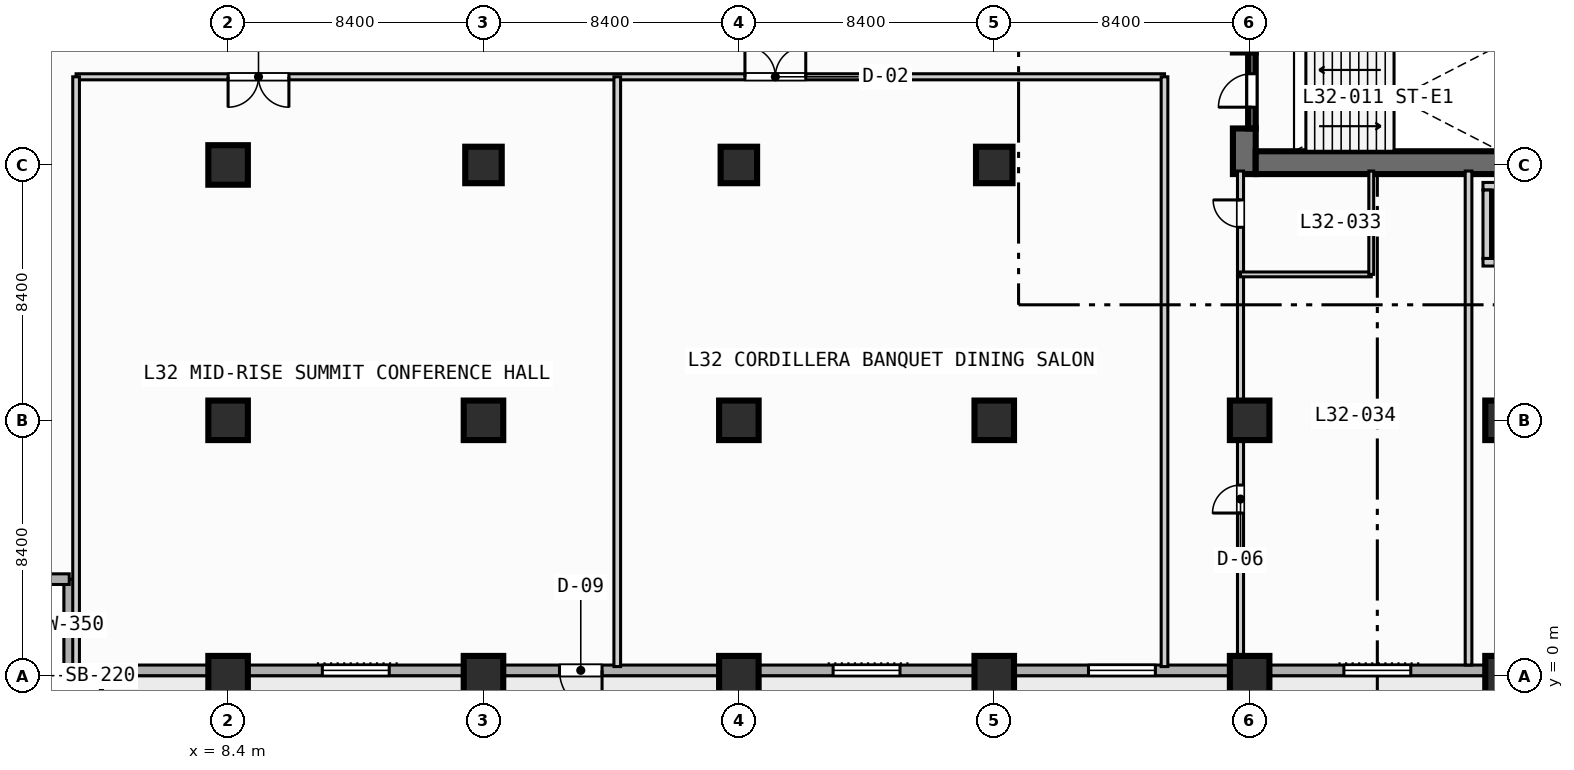
"""IFC4 building model, lengths in metres.
Left out: names, types, materials, properties, quantities, classifications, styles, units other than length and angle.
Written with IfcOpenShell. Run it as: python <this file> out.ifc"""

import sys

from ifc_helpers import new_model, si_unit, direction, frame, frame_2d, origin, origin_2d, place, context, subcontext, project, spatial, rectangle, extrude, element, fill, save


model = new_model("IFC4")
c1 = context("Model", 3, precision=1e-05, world=origin(), true_north=direction((0.0, 1.0)))
c2 = subcontext(c1, "Body", "Model", "MODEL_VIEW")
j1 = project(units=[si_unit("LENGTHUNIT", "METRE"), si_unit("PLANEANGLEUNIT", "RADIAN")], contexts=[c1])
p1 = place(None, origin())
s1 = spatial("IfcSite", under=j1, at=p1, CompositionType="ELEMENT")
p2 = place(p1, origin())
s2 = spatial("IfcBuilding", under=s1, at=p2, CompositionType="ELEMENT")
p3 = place(p2, frame((0.0, 0.0, 134.2)))
s3 = spatial("IfcBuildingStorey", under=s2, at=p3, CompositionType="ELEMENT", Elevation=134.2)
p4 = place(p3, frame((41.825, 16.5, 0.0), z_axis=(0.0, 0.0, 1.0), x_axis=(0.0, 1.0, 0.0)))
e1 = element("IfcWall", 1, at=p4, inside=s3, PredefinedType="SHEAR", context=c2, shape_type="SweptSolid", body=[
    extrude(rectangle(XDim=1.5, YDim=0.75, at=frame_2d((0.75, 0.0))), origin(), (0.0, 0.0, 1.0), 3.55),
])
p5 = place(p3, frame((42.2, 16.875, 0.0), z_axis=(0.0, 0.0, 1.0), x_axis=(1.0, 0.0, 0.0)))
e2 = element("IfcWall", 2, at=p5, inside=s3, PredefinedType="SHEAR", context=c2, shape_type="SweptSolid", body=[
    extrude(rectangle(XDim=16.35, YDim=0.75, at=frame_2d((8.175, 0.0))), origin(), (0.0, 0.0, 1.0), 3.55),
])
for number, where, z_axis, x_axis in (
    (3, (8.4, 0.0, 0.0), (0.0, 0.0, 1.0), (1.0, 0.0, 0.0)),
    (4, (8.4, 8.4, 0.0), (0.0, 0.0, 1.0), (1.0, 0.0, 0.0)),
    (5, (8.4, 16.8, 0.0), (0.0, 0.0, 1.0), (1.0, 0.0, 0.0)),
    (6, (16.8, 0.0, 0.0), (0.0, 0.0, 1.0), (1.0, 0.0, 0.0)),
    (7, (16.8, 8.4, 0.0), (0.0, 0.0, 1.0), (1.0, 0.0, 0.0)),
):
    element("IfcColumn", number, at=place(p3, frame(where, z_axis=z_axis, x_axis=x_axis)), inside=s3, PredefinedType="COLUMN", context=c2, shape_type="SweptSolid", body=[
        extrude(rectangle(XDim=1.3, YDim=1.3, at=origin_2d()), origin(), (0.0, 0.0, 1.0), 3.8),
    ])
p6 = place(p3, frame((16.8, 16.8, 0.0), z_axis=(0.0, 0.0, 1.0), x_axis=(1.0, 0.0, 0.0)))
e8 = element("IfcColumn", 8, at=p6, inside=s3, PredefinedType="COLUMN", context=c2, shape_type="SweptSolid", body=[
    extrude(rectangle(XDim=1.2, YDim=1.2, at=origin_2d()), origin(), (0.0, 0.0, 1.0), 3.8),
])
for number, where, z_axis, x_axis in (
    (9, (25.2, 0.0, 0.0), (0.0, 0.0, 1.0), (1.0, 0.0, 0.0)),
    (10, (25.2, 8.4, 0.0), (0.0, 0.0, 1.0), (1.0, 0.0, 0.0)),
):
    element("IfcColumn", number, at=place(p3, frame(where, z_axis=z_axis, x_axis=x_axis)), inside=s3, PredefinedType="COLUMN", context=c2, shape_type="SweptSolid", body=[
        extrude(rectangle(XDim=1.3, YDim=1.3, at=origin_2d()), origin(), (0.0, 0.0, 1.0), 3.8),
    ])
p7 = place(p3, frame((25.2, 16.8, 0.0), z_axis=(0.0, 0.0, 1.0), x_axis=(1.0, 0.0, 0.0)))
e11 = element("IfcColumn", 11, at=p7, inside=s3, PredefinedType="COLUMN", context=c2, shape_type="SweptSolid", body=[
    extrude(rectangle(XDim=1.2, YDim=1.2, at=origin_2d()), origin(), (0.0, 0.0, 1.0), 3.8),
])
for number, where, z_axis, x_axis in (
    (12, (33.6, 0.0, 0.0), (0.0, 0.0, 1.0), (1.0, 0.0, 0.0)),
    (13, (33.6, 8.4, 0.0), (0.0, 0.0, 1.0), (1.0, 0.0, 0.0)),
):
    element("IfcColumn", number, at=place(p3, frame(where, z_axis=z_axis, x_axis=x_axis)), inside=s3, PredefinedType="COLUMN", context=c2, shape_type="SweptSolid", body=[
        extrude(rectangle(XDim=1.3, YDim=1.3, at=origin_2d()), origin(), (0.0, 0.0, 1.0), 3.8),
    ])
p8 = place(p3, frame((33.6, 16.8, 0.0), z_axis=(0.0, 0.0, 1.0), x_axis=(1.0, 0.0, 0.0)))
e14 = element("IfcColumn", 14, at=p8, inside=s3, PredefinedType="COLUMN", context=c2, shape_type="SweptSolid", body=[
    extrude(rectangle(XDim=1.2, YDim=1.2, at=origin_2d()), origin(), (0.0, 0.0, 1.0), 3.8),
])
for number, where, z_axis, x_axis in (
    (15, (42.0, 0.0, 0.0), (0.0, 0.0, 1.0), (1.0, 0.0, 0.0)),
    (16, (42.0, 8.4, 0.0), (0.0, 0.0, 1.0), (1.0, 0.0, 0.0)),
    (17, (50.4, 0.0, 0.0), (0.0, 0.0, 1.0), (1.0, 0.0, 0.0)),
    (18, (50.4, 8.4, 0.0), (0.0, 0.0, 1.0), (1.0, 0.0, 0.0)),
):
    element("IfcColumn", number, at=place(p3, frame(where, z_axis=z_axis, x_axis=x_axis)), inside=s3, PredefinedType="COLUMN", context=c2, shape_type="SweptSolid", body=[
        extrude(rectangle(XDim=1.3, YDim=1.3, at=origin_2d()), origin(), (0.0, 0.0, 1.0), 3.8),
    ])
for number, where, z_axis, x_axis in (
    (19, (3.175, 0.175, 0.0), (0.0, 0.0, 1.0), (0.0, 1.0, 0.0)),
    (20, (3.175, 3.175, 0.0), (0.0, 0.0, 1.0), (-1.0, 0.0, 0.0)),
):
    element("IfcWall", number, at=place(p3, frame(where, z_axis=z_axis, x_axis=x_axis)), inside=s3, PredefinedType="STANDARD", context=c2, shape_type="SweptSolid", body=[
        extrude(rectangle(XDim=3.0, YDim=0.35, at=frame_2d((1.5, 0.0))), origin(), (0.0, 0.0, 1.0), 3.55),
    ])
p9 = place(p3, frame((72.425, 0.175, 0.0), z_axis=(0.0, 0.0, 1.0), x_axis=(-1.0, 0.0, 0.0)))
e21 = element("IfcWall", 21, at=p9, inside=s3, PredefinedType="STANDARD", context=c2, shape_type="SweptSolid", body=[
    extrude(rectangle(XDim=69.25, YDim=0.35, at=frame_2d((34.625, 0.0))), origin(), (0.0, 0.0, 1.0), 3.55),
])
p10 = place(p9, frame((51.725, 0.0, 0.0)))
e22 = element("IfcOpeningElement", 22, at=p10, cuts=e21, PredefinedType="OPENING", context=c2, shape_type="SweptSolid", body=[
    extrude(rectangle(XDim=1.4, YDim=2.2, at=frame_2d((0.7, 1.1))), frame((0.0, 0.185, 0.0), z_axis=(0.0, -1.0, 0.0), x_axis=(1.0, 0.0, 0.0)), (0.0, 0.0, 1.0), 0.37),
])
p11 = place(p9, frame((58.725, 0.0, 0.85)))
e23 = element("IfcOpeningElement", 23, at=p11, cuts=e21, PredefinedType="OPENING", context=c2, shape_type="SweptSolid", body=[
    extrude(rectangle(XDim=2.2, YDim=1.8, at=frame_2d((1.1, 0.9))), frame((0.0, 0.185, 0.0), z_axis=(0.0, -1.0, 0.0), x_axis=(1.0, 0.0, 0.0)), (0.0, 0.0, 1.0), 0.37),
])
p12 = place(p9, frame((41.925, 0.0, 0.85)))
e24 = element("IfcOpeningElement", 24, at=p12, cuts=e21, PredefinedType="OPENING", context=c2, shape_type="SweptSolid", body=[
    extrude(rectangle(XDim=2.2, YDim=1.8, at=frame_2d((1.1, 0.9))), frame((0.0, 0.185, 0.0), z_axis=(0.0, -1.0, 0.0), x_axis=(1.0, 0.0, 0.0)), (0.0, 0.0, 1.0), 0.37),
])
p13 = place(p9, frame((33.525, 0.0, 0.85)))
e25 = element("IfcOpeningElement", 25, at=p13, cuts=e21, PredefinedType="OPENING", context=c2, shape_type="SweptSolid", body=[
    extrude(rectangle(XDim=2.2, YDim=1.8, at=frame_2d((1.1, 0.9))), frame((0.0, 0.185, 0.0), z_axis=(0.0, -1.0, 0.0), x_axis=(1.0, 0.0, 0.0)), (0.0, 0.0, 1.0), 0.37),
])
p14 = place(p9, frame((25.125, 0.0, 0.85)))
e26 = element("IfcOpeningElement", 26, at=p14, cuts=e21, PredefinedType="OPENING", context=c2, shape_type="SweptSolid", body=[
    extrude(rectangle(XDim=2.2, YDim=1.8, at=frame_2d((1.1, 0.9))), frame((0.0, 0.185, 0.0), z_axis=(0.0, -1.0, 0.0), x_axis=(1.0, 0.0, 0.0)), (0.0, 0.0, 1.0), 0.37),
])
p15 = place(p3, frame((42.075, 18.0, 0.0), z_axis=(0.0, 0.0, 1.0), x_axis=(0.0, 1.0, 0.0)))
e27 = element("IfcWall", 27, at=p15, inside=s3, PredefinedType="SOLIDWALL", context=c2, shape_type="SweptSolid", body=[
    extrude(rectangle(XDim=2.5, YDim=0.25, at=frame_2d((1.25, 0.0))), origin(), (0.0, 0.0, 1.0), 3.55),
])
p16 = place(p15, frame((0.7, 0.0, 0.0)))
e28 = element("IfcOpeningElement", 28, at=p16, cuts=e27, PredefinedType="OPENING", context=c2, shape_type="SweptSolid", body=[
    extrude(rectangle(XDim=1.1, YDim=2.15, at=frame_2d((0.55, 1.075))), frame((0.0, 0.135, 0.0), z_axis=(0.0, -1.0, 0.0), x_axis=(1.0, 0.0, 0.0)), (0.0, 0.0, 1.0), 0.27),
])
p17 = place(p3, frame((49.675, 13.6, 0.0), z_axis=(0.0, 0.0, 1.0), x_axis=(1.0, 0.0, 0.0)))
e29 = element("IfcWall", 29, at=p17, inside=s3, PredefinedType="SOLIDWALL", context=c2, shape_type="SweptSolid", body=[
    extrude(rectangle(XDim=2.25, YDim=0.25, at=frame_2d((1.125, 0.0))), origin(), (0.0, 0.0, 1.0), 3.55),
])
p18 = place(p17, frame((0.4, 0.0, 0.0)))
e30 = element("IfcOpeningElement", 30, at=p18, cuts=e29, PredefinedType="OPENING", context=c2, shape_type="SweptSolid", body=[
    extrude(rectangle(XDim=1.1, YDim=2.15, at=frame_2d((0.55, 1.075))), frame((0.0, 0.135, 0.0), z_axis=(0.0, -1.0, 0.0), x_axis=(1.0, 0.0, 0.0)), (0.0, 0.0, 1.0), 0.27),
])
for number, where, z_axis, x_axis in (
    (31, (49.675, 16.1, 0.0), (0.0, 0.0, 1.0), (1.0, 0.0, 0.0)),
    (32, (49.8, 13.725, 0.0), (0.0, 0.0, 1.0), (0.0, 1.0, 0.0)),
):
    element("IfcWall", number, at=place(p3, frame(where, z_axis=z_axis, x_axis=x_axis)), inside=s3, PredefinedType="SOLIDWALL", context=c2, shape_type="SweptSolid", body=[
        extrude(rectangle(XDim=2.25, YDim=0.25, at=frame_2d((1.125, 0.0))), origin(), (0.0, 0.0, 1.0), 3.55),
    ])
p19 = place(p3, frame((41.7, 0.35, 0.0), z_axis=(0.0, 0.0, 1.0), x_axis=(0.0, 1.0, 0.0)))
e33 = element("IfcWall", 33, at=p19, inside=s3, PredefinedType="PARTITIONING", context=c2, shape_type="SweptSolid", body=[
    extrude(rectangle(XDim=16.25, YDim=0.2, at=frame_2d((8.125, 0.0))), origin(), (0.0, 0.0, 1.0), 2.8),
])
p20 = place(p19, frame((5.0, 0.0, 0.0)))
e34 = element("IfcOpeningElement", 34, at=p20, cuts=e33, PredefinedType="OPENING", context=c2, shape_type="SweptSolid", body=[
    extrude(rectangle(XDim=0.92, YDim=2.1, at=frame_2d((0.46, 1.05))), frame((0.0, 0.11, 0.0), z_axis=(0.0, -1.0, 0.0), x_axis=(1.0, 0.0, 0.0)), (0.0, 0.0, 1.0), 0.22),
])
p21 = place(p19, frame((14.4, 0.0, 0.0)))
e35 = element("IfcOpeningElement", 35, at=p21, cuts=e33, PredefinedType="OPENING", context=c2, shape_type="SweptSolid", body=[
    extrude(rectangle(XDim=0.9, YDim=2.1, at=frame_2d((0.45, 1.05))), frame((0.0, 0.11, 0.0), z_axis=(0.0, -1.0, 0.0), x_axis=(1.0, 0.0, 0.0)), (0.0, 0.0, 1.0), 0.22),
])
p22 = place(p3, frame((49.2, 0.35, 0.0), z_axis=(0.0, 0.0, 1.0), x_axis=(0.0, 1.0, 0.0)))
e36 = element("IfcWall", 36, at=p22, inside=s3, PredefinedType="PARTITIONING", context=c2, shape_type="SweptSolid", body=[
    extrude(rectangle(XDim=16.25, YDim=0.22, at=frame_2d((8.125, 0.0))), origin(), (0.0, 0.0, 1.0), 3.55),
])
p23 = place(p3, frame((41.7, 13.2, 0.0), z_axis=(0.0, 0.0, 1.0), x_axis=(1.0, 0.0, 0.0)))
e37 = element("IfcWall", 37, at=p23, inside=s3, PredefinedType="PARTITIONING", context=c2, shape_type="SweptSolid", body=[
    extrude(rectangle(XDim=4.3, YDim=0.16, at=frame_2d((2.15, 0.0))), origin(), (0.0, 0.0, 1.0), 3.55),
])
p24 = place(p3, frame((46.0, 13.2, 0.0), z_axis=(0.0, 0.0, 1.0), x_axis=(0.0, 1.0, 0.0)))
e38 = element("IfcWall", 38, at=p24, inside=s3, PredefinedType="PARTITIONING", context=c2, shape_type="SweptSolid", body=[
    extrude(rectangle(XDim=3.4, YDim=0.16, at=frame_2d((1.7, 0.0))), origin(), (0.0, 0.0, 1.0), 3.55),
])
p25 = place(p3, frame((3.4, 19.7, 0.0), z_axis=(0.0, 0.0, 1.0), x_axis=(1.0, 0.0, 0.0)))
e39 = element("IfcWall", 39, at=p25, inside=s3, PredefinedType="PARTITIONING", context=c2, shape_type="SweptSolid", body=[
    extrude(rectangle(XDim=35.8, YDim=0.2, at=frame_2d((17.9, 0.0))), origin(), (0.0, 0.0, 1.0), 3.55),
])
p26 = place(p25, frame((5.0, 0.0, 0.0)))
e40 = element("IfcOpeningElement", 40, at=p26, cuts=e39, PredefinedType="OPENING", context=c2, shape_type="SweptSolid", body=[
    extrude(rectangle(XDim=2.0, YDim=2.15, at=frame_2d((1.0, 1.075))), frame((0.0, 0.11, 0.0), z_axis=(0.0, -1.0, 0.0), x_axis=(1.0, 0.0, 0.0)), (0.0, 0.0, 1.0), 0.22),
])
p27 = place(p25, frame((22.0, 0.0, 0.0)))
e41 = element("IfcOpeningElement", 41, at=p27, cuts=e39, PredefinedType="OPENING", context=c2, shape_type="SweptSolid", body=[
    extrude(rectangle(XDim=2.0, YDim=2.15, at=frame_2d((1.0, 1.075))), frame((0.0, 0.11, 0.0), z_axis=(0.0, -1.0, 0.0), x_axis=(1.0, 0.0, 0.0)), (0.0, 0.0, 1.0), 0.22),
])
for number, where, z_axis, x_axis in (
    (42, (3.4, 0.3, 0.0), (0.0, 0.0, 1.0), (0.0, 1.0, 0.0)),
    (43, (21.2, 0.3, 0.0), (0.0, 0.0, 1.0), (0.0, 1.0, 0.0)),
    (44, (39.2, 0.3, 0.0), (0.0, 0.0, 1.0), (0.0, 1.0, 0.0)),
):
    element("IfcWall", number, at=place(p3, frame(where, z_axis=z_axis, x_axis=x_axis)), inside=s3, PredefinedType="PARTITIONING", context=c2, shape_type="SweptSolid", body=[
        extrude(rectangle(XDim=19.4, YDim=0.22, at=frame_2d((9.7, 0.0))), origin(), (0.0, 0.0, 1.0), 3.55),
    ])
p28 = place(p10, origin())
e45 = element("IfcDoor", 45, at=p28, inside=s3, OperationType="SINGLE_SWING_LEFT", PredefinedType="DOOR", context=c2, shape_type="SweptSolid", body=[
    extrude(rectangle(XDim=1.4, YDim=2.2, at=frame_2d((0.7, 1.1))), frame((0.0, 0.025, 0.0), z_axis=(0.0, -1.0, 0.0), x_axis=(1.0, 0.0, 0.0)), (0.0, 0.0, 1.0), 0.05),
])
fill(e22, e45)
p29 = place(p11, origin())
e46 = element("IfcWindow", 46, at=p29, inside=s3, PartitioningType="SINGLE_PANEL", PredefinedType="WINDOW", context=c2, shape_type="SweptSolid", body=[
    extrude(rectangle(XDim=2.2, YDim=1.8, at=frame_2d((1.1, 0.9))), frame((0.0, 0.03, 0.0), z_axis=(0.0, -1.0, 0.0), x_axis=(1.0, 0.0, 0.0)), (0.0, 0.0, 1.0), 0.06),
])
fill(e23, e46)
p30 = place(p12, origin())
e47 = element("IfcWindow", 47, at=p30, inside=s3, PartitioningType="SINGLE_PANEL", PredefinedType="WINDOW", context=c2, shape_type="SweptSolid", body=[
    extrude(rectangle(XDim=2.2, YDim=1.8, at=frame_2d((1.1, 0.9))), frame((0.0, 0.03, 0.0), z_axis=(0.0, -1.0, 0.0), x_axis=(1.0, 0.0, 0.0)), (0.0, 0.0, 1.0), 0.06),
])
fill(e24, e47)
p31 = place(p13, origin())
e48 = element("IfcWindow", 48, at=p31, inside=s3, PartitioningType="SINGLE_PANEL", PredefinedType="WINDOW", context=c2, shape_type="SweptSolid", body=[
    extrude(rectangle(XDim=2.2, YDim=1.8, at=frame_2d((1.1, 0.9))), frame((0.0, 0.03, 0.0), z_axis=(0.0, -1.0, 0.0), x_axis=(1.0, 0.0, 0.0)), (0.0, 0.0, 1.0), 0.06),
])
fill(e25, e48)
p32 = place(p14, origin())
e49 = element("IfcWindow", 49, at=p32, inside=s3, PartitioningType="SINGLE_PANEL", PredefinedType="WINDOW", context=c2, shape_type="SweptSolid", body=[
    extrude(rectangle(XDim=2.2, YDim=1.8, at=frame_2d((1.1, 0.9))), frame((0.0, 0.03, 0.0), z_axis=(0.0, -1.0, 0.0), x_axis=(1.0, 0.0, 0.0)), (0.0, 0.0, 1.0), 0.06),
])
fill(e26, e49)
p33 = place(p16, origin())
e50 = element("IfcDoor", 50, at=p33, inside=s3, OperationType="SINGLE_SWING_LEFT", PredefinedType="DOOR", context=c2, shape_type="SweptSolid", body=[
    extrude(rectangle(XDim=1.1, YDim=2.15, at=frame_2d((0.55, 1.075))), frame((0.0, 0.025, 0.0), z_axis=(0.0, -1.0, 0.0), x_axis=(1.0, 0.0, 0.0)), (0.0, 0.0, 1.0), 0.05),
])
fill(e28, e50)
p34 = place(p20, origin())
e51 = element("IfcDoor", 51, at=p34, inside=s3, OperationType="SINGLE_SWING_LEFT", PredefinedType="DOOR", context=c2, shape_type="SweptSolid", body=[
    extrude(rectangle(XDim=0.92, YDim=2.1, at=frame_2d((0.46, 1.05))), frame((0.0, 0.025, 0.0), z_axis=(0.0, -1.0, 0.0), x_axis=(1.0, 0.0, 0.0)), (0.0, 0.0, 1.0), 0.05),
])
fill(e34, e51)
p35 = place(p21, origin())
e52 = element("IfcDoor", 52, at=p35, inside=s3, OperationType="SINGLE_SWING_RIGHT", PredefinedType="DOOR", context=c2, shape_type="SweptSolid", body=[
    extrude(rectangle(XDim=0.9, YDim=2.1, at=frame_2d((0.45, 1.05))), frame((0.0, 0.025, 0.0), z_axis=(0.0, -1.0, 0.0), x_axis=(1.0, 0.0, 0.0)), (0.0, 0.0, 1.0), 0.05),
])
fill(e35, e52)
p36 = place(p26, origin())
e53 = element("IfcDoor", 53, at=p36, inside=s3, OperationType="SINGLE_SWING_RIGHT", PredefinedType="DOOR", context=c2, shape_type="SweptSolid", body=[
    extrude(rectangle(XDim=2.0, YDim=2.15, at=frame_2d((1.0, 1.075))), frame((0.0, 0.025, 0.0), z_axis=(0.0, -1.0, 0.0), x_axis=(1.0, 0.0, 0.0)), (0.0, 0.0, 1.0), 0.05),
])
fill(e40, e53)
p37 = place(p27, origin())
e54 = element("IfcDoor", 54, at=p37, inside=s3, OperationType="SINGLE_SWING_LEFT", PredefinedType="DOOR", context=c2, shape_type="SweptSolid", body=[
    extrude(rectangle(XDim=2.0, YDim=2.15, at=frame_2d((1.0, 1.075))), frame((0.0, 0.025, 0.0), z_axis=(0.0, -1.0, 0.0), x_axis=(1.0, 0.0, 0.0)), (0.0, 0.0, 1.0), 0.05),
])
fill(e41, e54)
save(model, sys.argv[1])
